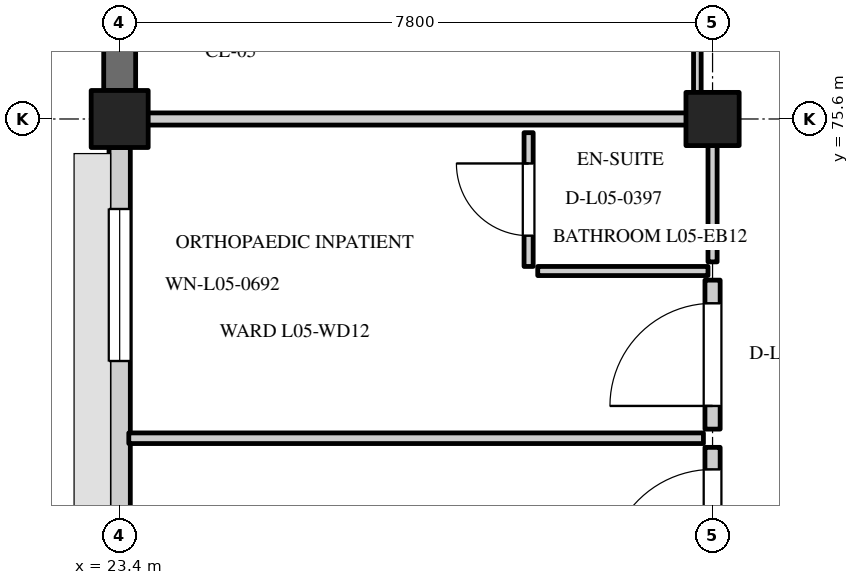
"""IFC4 building model, lengths in metres.
Left out: names, types, materials, properties, quantities, classifications, styles, units other than length and angle.
Written with IfcOpenShell. Run it as: python <this file> out.ifc"""

import sys

from ifc_helpers import new_model, si_unit, direction, frame, frame_2d, origin, origin_2d, place, context, subcontext, project, spatial, rectangle, extrude, element, fill, save


model = new_model("IFC4")
c1 = context("Model", 3, precision=1e-05, world=origin(), true_north=direction((0.0, 1.0)))
c2 = subcontext(c1, "Body", "Model", "MODEL_VIEW")
j1 = project(units=[si_unit("LENGTHUNIT", "METRE"), si_unit("PLANEANGLEUNIT", "RADIAN")], contexts=[c1])
p1 = place(None, origin())
s1 = spatial("IfcSite", under=j1, at=p1, CompositionType="ELEMENT")
p2 = place(p1, origin())
s2 = spatial("IfcBuilding", under=s1, at=p2, CompositionType="ELEMENT")
p3 = place(p2, frame((0.0, 0.0, 22.2)))
s3 = spatial("IfcBuildingStorey", under=s2, at=p3, CompositionType="ELEMENT", Elevation=22.2)
p4 = place(p3, frame((23.4, 75.6, 0.0), z_axis=(0.0, 0.0, 1.0), x_axis=(1.0, 0.0, 0.0)))
e1 = element("IfcColumn", 1, at=p4, inside=s3, PredefinedType="COLUMN", context=c2, shape_type="SweptSolid", body=[
    extrude(rectangle(XDim=0.75, YDim=0.75, at=origin_2d()), origin(), (0.0, 0.0, 1.0), 3.9),
])
p5 = place(p3, frame((31.2, 75.6, 0.0), z_axis=(0.0, 0.0, 1.0), x_axis=(1.0, 0.0, 0.0)))
e2 = element("IfcColumn", 2, at=p5, inside=s3, PredefinedType="COLUMN", context=c2, shape_type="SweptSolid", body=[
    extrude(rectangle(XDim=0.7, YDim=0.7, at=origin_2d()), origin(), (0.0, 0.0, 1.0), 3.9),
])
p6 = place(p3, frame((23.4, 67.575, 0.0), z_axis=(0.0, 0.0, 1.0), x_axis=(0.0, 1.0, 0.0)))
e3 = element("IfcWall", 3, at=p6, inside=s3, PredefinedType="STANDARD", context=c2, shape_type="SweptSolid", body=[
    extrude(rectangle(XDim=7.65, YDim=0.28, at=frame_2d((3.825, 0.0))), origin(), (0.0, 0.0, 1.0), 2.95),
])
p7 = place(p6, frame((0.809, 0.0, 0.8)))
e4 = element("IfcOpeningElement", 4, at=p7, cuts=e3, PredefinedType="OPENING", context=c2, shape_type="SweptSolid", body=[
    extrude(rectangle(XDim=2.0, YDim=1.65, at=frame_2d((1.0, 0.825))), frame((0.0, 0.152, 0.0), z_axis=(0.0, -1.0, 0.0), x_axis=(1.0, 0.0, 0.0)), (0.0, 0.0, 1.0), 0.304),
])
p8 = place(p6, frame((4.841, 0.0, 0.8)))
e5 = element("IfcOpeningElement", 5, at=p8, cuts=e3, PredefinedType="OPENING", context=c2, shape_type="SweptSolid", body=[
    extrude(rectangle(XDim=2.0, YDim=1.65, at=frame_2d((1.0, 0.825))), frame((0.0, 0.152, 0.0), z_axis=(0.0, -1.0, 0.0), x_axis=(1.0, 0.0, 0.0)), (0.0, 0.0, 1.0), 0.304),
])
p9 = place(p3, frame((23.4, 75.975, 0.0), z_axis=(0.0, 0.0, 1.0), x_axis=(0.0, 1.0, 0.0)))
e6 = element("IfcWall", 6, at=p9, inside=s3, PredefinedType="SOLIDWALL", context=c2, shape_type="SweptSolid", body=[
    extrude(rectangle(XDim=7.65, YDim=0.42, at=frame_2d((3.825, 0.0))), origin(), (0.0, 0.0, 1.0), 2.95),
])
p10 = place(p9, frame((3.325, 0.0, 0.8)))
e7 = element("IfcOpeningElement", 7, at=p10, cuts=e6, PredefinedType="OPENING", context=c2, shape_type="SweptSolid", body=[
    extrude(rectangle(XDim=1.0, YDim=1.45, at=frame_2d((0.5, 0.725))), frame((0.0, 0.222, 0.0), z_axis=(0.0, -1.0, 0.0), x_axis=(1.0, 0.0, 0.0)), (0.0, 0.0, 1.0), 0.444),
])
p11 = place(p3, frame((23.52, 71.4, 0.0), z_axis=(0.0, 0.0, 1.0), x_axis=(1.0, 0.0, 0.0)))
e8 = element("IfcWall", 8, at=p11, inside=s3, PredefinedType="PARTITIONING", context=c2, shape_type="SweptSolid", body=[
    extrude(rectangle(XDim=7.56, YDim=0.14, at=frame_2d((3.78, 0.0))), origin(), (0.0, 0.0, 1.0), 3.58),
])
p12 = place(p3, frame((31.2, 69.32, 0.0), z_axis=(0.0, 0.0, 1.0), x_axis=(0.0, 1.0, 0.0)))
e9 = element("IfcWall", 9, at=p12, inside=s3, PredefinedType="STANDARD", context=c2, shape_type="SweptSolid", body=[
    extrude(rectangle(XDim=1.96, YDim=0.2, at=frame_2d((0.98, 0.0))), origin(), (0.0, 0.0, 1.0), 3.58),
])
p13 = place(p12, frame((0.29, 0.0, 0.0)))
e10 = element("IfcOpeningElement", 10, at=p13, cuts=e9, PredefinedType="OPENING", context=c2, shape_type="SweptSolid", body=[
    extrude(rectangle(XDim=1.38, YDim=2.2, at=frame_2d((0.69, 1.1))), frame((0.0, 0.112, 0.0), z_axis=(0.0, -1.0, 0.0), x_axis=(1.0, 0.0, 0.0)), (0.0, 0.0, 1.0), 0.224),
])
p14 = place(p3, frame((23.52, 75.6, 0.0), z_axis=(0.0, 0.0, 1.0), x_axis=(1.0, 0.0, 0.0)))
e11 = element("IfcWall", 11, at=p14, inside=s3, PredefinedType="PARTITIONING", context=c2, shape_type="SweptSolid", body=[
    extrude(rectangle(XDim=7.56, YDim=0.16, at=frame_2d((3.78, 0.0))), origin(), (0.0, 0.0, 1.0), 2.95),
])
p15 = place(p3, frame((31.2, 71.52, 0.0), z_axis=(0.0, 0.0, 1.0), x_axis=(0.0, 1.0, 0.0)))
e12 = element("IfcWall", 12, at=p15, inside=s3, PredefinedType="STANDARD", context=c2, shape_type="SweptSolid", body=[
    extrude(rectangle(XDim=1.96, YDim=0.2, at=frame_2d((0.98, 0.0))), origin(), (0.0, 0.0, 1.0), 3.58),
])
p16 = place(p15, frame((0.305, 0.0, 0.0)))
e13 = element("IfcOpeningElement", 13, at=p16, cuts=e12, PredefinedType="OPENING", context=c2, shape_type="SweptSolid", body=[
    extrude(rectangle(XDim=1.35, YDim=2.15, at=frame_2d((0.675, 1.075))), frame((0.0, 0.112, 0.0), z_axis=(0.0, -1.0, 0.0), x_axis=(1.0, 0.0, 0.0)), (0.0, 0.0, 1.0), 0.224),
])
p17 = place(p3, frame((31.2, 73.72, 0.0), z_axis=(0.0, 0.0, 1.0), x_axis=(0.0, 1.0, 0.0)))
e14 = element("IfcWall", 14, at=p17, inside=s3, PredefinedType="PARTITIONING", context=c2, shape_type="SweptSolid", body=[
    extrude(rectangle(XDim=1.76, YDim=0.12, at=frame_2d((0.88, 0.0))), origin(), (0.0, 0.0, 1.0), 3.58),
])
p18 = place(p3, frame((28.9, 73.6, 0.0), z_axis=(0.0, 0.0, 1.0), x_axis=(1.0, 0.0, 0.0)))
e15 = element("IfcWall", 15, at=p18, inside=s3, PredefinedType="PARTITIONING", context=c2, shape_type="SweptSolid", body=[
    extrude(rectangle(XDim=2.24, YDim=0.12, at=frame_2d((1.12, 0.0))), origin(), (0.0, 0.0, 1.0), 3.58),
])
p19 = place(p3, frame((28.78, 73.66, 0.0), z_axis=(0.0, 0.0, 1.0), x_axis=(0.0, 1.0, 0.0)))
e16 = element("IfcWall", 16, at=p19, inside=s3, PredefinedType="PARTITIONING", context=c2, shape_type="SweptSolid", body=[
    extrude(rectangle(XDim=1.76, YDim=0.12, at=frame_2d((0.88, 0.0))), origin(), (0.0, 0.0, 1.0), 3.58),
])
p20 = place(p19, frame((0.405, 0.0, 0.0)))
e17 = element("IfcOpeningElement", 17, at=p20, cuts=e16, PredefinedType="OPENING", context=c2, shape_type="SweptSolid", body=[
    extrude(rectangle(XDim=0.95, YDim=2.1, at=frame_2d((0.475, 1.05))), frame((0.0, 0.072, 0.0), z_axis=(0.0, -1.0, 0.0), x_axis=(1.0, 0.0, 0.0)), (0.0, 0.0, 1.0), 0.144),
])
p21 = place(p3, frame((31.0, 75.885, 0.0), z_axis=(0.0, 0.0, 1.0), x_axis=(0.0, 1.0, 0.0)))
e18 = element("IfcWall", 18, at=p21, inside=s3, PredefinedType="PARTITIONING", context=c2, shape_type="SweptSolid", body=[
    extrude(rectangle(XDim=8.18, YDim=0.1, at=frame_2d((4.09, 0.0))), origin(), (0.0, 0.0, 1.0), 3.58),
])
p22 = place(p21, frame((2.296, 0.0, 0.0)))
e19 = element("IfcOpeningElement", 19, at=p22, cuts=e18, PredefinedType="OPENING", context=c2, shape_type="SweptSolid", body=[
    extrude(rectangle(XDim=1.2, YDim=2.15, at=frame_2d((0.6, 1.075))), frame((0.0, 0.062, 0.0), z_axis=(0.0, -1.0, 0.0), x_axis=(1.0, 0.0, 0.0)), (0.0, 0.0, 1.0), 0.124),
])
p23 = place(p8, origin())
e20 = element("IfcWindow", 20, at=p23, inside=s3, PartitioningType="DOUBLE_PANEL_VERTICAL", PredefinedType="WINDOW", context=c2, shape_type="SweptSolid", body=[
    extrude(rectangle(XDim=2.0, YDim=1.65, at=frame_2d((1.0, 0.825))), frame((0.0, 0.03, 0.0), z_axis=(0.0, -1.0, 0.0), x_axis=(1.0, 0.0, 0.0)), (0.0, 0.0, 1.0), 0.06),
])
fill(e5, e20)
p24 = place(p13, origin())
e21 = element("IfcDoor", 21, at=p24, inside=s3, OperationType="SINGLE_SWING_LEFT", PredefinedType="DOOR", context=c2, shape_type="SweptSolid", body=[
    extrude(rectangle(XDim=1.38, YDim=2.2, at=frame_2d((0.69, 1.1))), frame((0.0, 0.025, 0.0), z_axis=(0.0, -1.0, 0.0), x_axis=(1.0, 0.0, 0.0)), (0.0, 0.0, 1.0), 0.05),
])
fill(e10, e21)
p25 = place(p16, origin())
e22 = element("IfcDoor", 22, at=p25, inside=s3, OperationType="SINGLE_SWING_LEFT", PredefinedType="DOOR", context=c2, shape_type="SweptSolid", body=[
    extrude(rectangle(XDim=1.35, YDim=2.15, at=frame_2d((0.675, 1.075))), frame((0.0, 0.025, 0.0), z_axis=(0.0, -1.0, 0.0), x_axis=(1.0, 0.0, 0.0)), (0.0, 0.0, 1.0), 0.05),
])
fill(e13, e22)
p26 = place(p20, frame((0.95, 0.0, 0.0), z_axis=(0.0, 0.0, 1.0), x_axis=(-1.0, 0.0, 0.0)))
e23 = element("IfcDoor", 23, at=p26, inside=s3, OperationType="SINGLE_SWING_LEFT", PredefinedType="DOOR", context=c2, shape_type="SweptSolid", body=[
    extrude(rectangle(XDim=0.95, YDim=2.1, at=frame_2d((0.475, 1.05))), frame((0.0, 0.025, 0.0), z_axis=(0.0, -1.0, 0.0), x_axis=(1.0, 0.0, 0.0)), (0.0, 0.0, 1.0), 0.05),
])
fill(e17, e23)
save(model, sys.argv[1])
